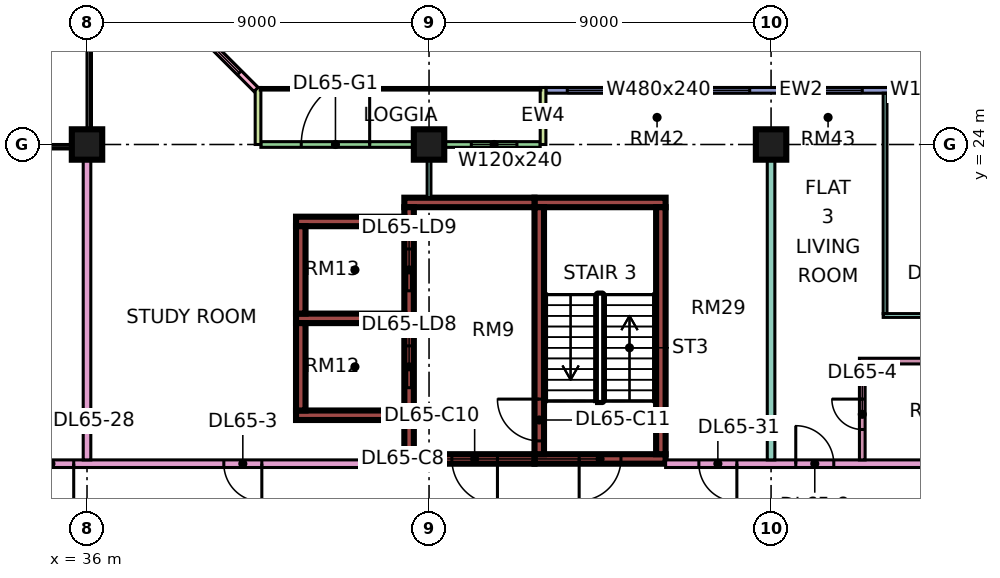
"""IFC4 building model, lengths in metres.
Left out: names, types, materials, properties, quantities, classifications, styles, units other than length and angle.
Written with IfcOpenShell. Run it as: python <this file> out.ifc"""

import sys

from ifc_helpers import new_model, si_unit, direction, frame, frame_2d, origin, origin_2d, place, context, subcontext, project, spatial, rectangle, extrude, element, fill, save


model = new_model("IFC4")
c1 = context("Model", 3, precision=1e-05, world=origin(), true_north=direction((0.0, 1.0)))
c2 = subcontext(c1, "Body", "Model", "MODEL_VIEW")
j1 = project(units=[si_unit("LENGTHUNIT", "METRE"), si_unit("PLANEANGLEUNIT", "RADIAN")], contexts=[c1])
p1 = place(None, origin())
s1 = spatial("IfcSite", under=j1, at=p1, CompositionType="ELEMENT")
p2 = place(p1, origin())
s2 = spatial("IfcBuilding", under=s1, at=p2, CompositionType="ELEMENT")
p3 = place(p2, frame((0.0, 0.0, 280.9)))
s3 = spatial("IfcBuildingStorey", under=s2, at=p3, CompositionType="ELEMENT", Elevation=280.9)
for number, where, z_axis, x_axis in (
    (1, (36.0, 24.0, 0.0), (0.0, 0.0, 1.0), (1.0, 0.0, 0.0)),
    (2, (45.0, 24.0, 0.0), (0.0, 0.0, 1.0), (1.0, 0.0, 0.0)),
    (3, (54.0, 24.0, 0.0), (0.0, 0.0, 1.0), (1.0, 0.0, 0.0)),
):
    element("IfcColumn", number, at=place(p3, frame(where, z_axis=z_axis, x_axis=x_axis)), inside=s3, PredefinedType="COLUMN", context=c2, shape_type="SweptSolid", body=[
        extrude(rectangle(XDim=0.8, YDim=0.8, at=origin_2d()), origin(), (0.0, 0.0, 1.0), 3.75),
    ])
p4 = place(p3, frame((47.775, 15.725, 0.0), z_axis=(0.0, 0.0, 1.0), x_axis=(1.0, 0.0, 0.0)))
e4 = element("IfcWall", 4, at=p4, inside=s3, PredefinedType="SHEAR", context=c2, shape_type="SweptSolid", body=[
    extrude(rectangle(XDim=3.45, YDim=0.25, at=frame_2d((1.725, 0.0))), origin(), (0.0, 0.0, 1.0), 3.75),
])
p5 = place(p4, frame((1.175, 0.0, 0.0)))
e5 = element("IfcOpeningElement", 5, at=p5, cuts=e4, PredefinedType="OPENING", context=c2, shape_type="SweptSolid", body=[
    extrude(rectangle(XDim=1.1, YDim=2.2, at=frame_2d((0.55, 1.1))), frame((0.0, 0.135, 0.0), z_axis=(0.0, -1.0, 0.0), x_axis=(1.0, 0.0, 0.0)), (0.0, 0.0, 1.0), 0.27),
])
p6 = place(p3, frame((47.775, 22.475, 0.0), z_axis=(0.0, 0.0, 1.0), x_axis=(1.0, 0.0, 0.0)))
e6 = element("IfcWall", 6, at=p6, inside=s3, PredefinedType="SHEAR", context=c2, shape_type="SweptSolid", body=[
    extrude(rectangle(XDim=3.45, YDim=0.25, at=frame_2d((1.725, 0.0))), origin(), (0.0, 0.0, 1.0), 3.75),
])
p7 = place(p3, frame((47.9, 15.85, 0.0), z_axis=(0.0, 0.0, 1.0), x_axis=(0.0, 1.0, 0.0)))
e7 = element("IfcWall", 7, at=p7, inside=s3, PredefinedType="SHEAR", context=c2, shape_type="SweptSolid", body=[
    extrude(rectangle(XDim=6.5, YDim=0.25, at=frame_2d((3.25, 0.0))), origin(), (0.0, 0.0, 1.0), 3.75),
])
p8 = place(p7, frame((0.35, 0.0, 0.0)))
e8 = element("IfcOpeningElement", 8, at=p8, cuts=e7, PredefinedType="OPENING", context=c2, shape_type="SweptSolid", body=[
    extrude(rectangle(XDim=1.1, YDim=2.2, at=frame_2d((0.55, 1.1))), frame((0.0, 0.135, 0.0), z_axis=(0.0, -1.0, 0.0), x_axis=(1.0, 0.0, 0.0)), (0.0, 0.0, 1.0), 0.27),
])
p9 = place(p3, frame((51.1, 15.85, 0.0), z_axis=(0.0, 0.0, 1.0), x_axis=(0.0, 1.0, 0.0)))
e9 = element("IfcWall", 9, at=p9, inside=s3, PredefinedType="SHEAR", context=c2, shape_type="SweptSolid", body=[
    extrude(rectangle(XDim=6.5, YDim=0.25, at=frame_2d((3.25, 0.0))), origin(), (0.0, 0.0, 1.0), 3.75),
])
p10 = place(p3, frame((44.35, 15.725, 0.0), z_axis=(0.0, 0.0, 1.0), x_axis=(1.0, 0.0, 0.0)))
e10 = element("IfcWall", 10, at=p10, inside=s3, PredefinedType="SHEAR", context=c2, shape_type="SweptSolid", body=[
    extrude(rectangle(XDim=3.425, YDim=0.25, at=frame_2d((1.712, 0.0))), origin(), (0.0, 0.0, 1.0), 3.75),
])
p11 = place(p10, frame((1.25, 0.0, 0.0)))
e11 = element("IfcOpeningElement", 11, at=p11, cuts=e10, PredefinedType="OPENING", context=c2, shape_type="SweptSolid", body=[
    extrude(rectangle(XDim=1.2, YDim=2.2, at=frame_2d((0.6, 1.1))), frame((0.0, 0.135, 0.0), z_axis=(0.0, -1.0, 0.0), x_axis=(1.0, 0.0, 0.0)), (0.0, 0.0, 1.0), 0.27),
])
p12 = place(p3, frame((44.35, 22.475, 0.0), z_axis=(0.0, 0.0, 1.0), x_axis=(1.0, 0.0, 0.0)))
e12 = element("IfcWall", 12, at=p12, inside=s3, PredefinedType="SHEAR", context=c2, shape_type="SweptSolid", body=[
    extrude(rectangle(XDim=3.425, YDim=0.25, at=frame_2d((1.712, 0.0))), origin(), (0.0, 0.0, 1.0), 3.75),
])
p13 = place(p3, frame((44.475, 15.85, 0.0), z_axis=(0.0, 0.0, 1.0), x_axis=(0.0, 1.0, 0.0)))
e13 = element("IfcWall", 13, at=p13, inside=s3, PredefinedType="SHEAR", context=c2, shape_type="SweptSolid", body=[
    extrude(rectangle(XDim=6.5, YDim=0.25, at=frame_2d((3.25, 0.0))), origin(), (0.0, 0.0, 1.0), 3.75),
])
p14 = place(p13, frame((1.75, 0.0, 0.0)))
e14 = element("IfcOpeningElement", 14, at=p14, cuts=e13, PredefinedType="OPENING", context=c2, shape_type="SweptSolid", body=[
    extrude(rectangle(XDim=1.1, YDim=2.2, at=frame_2d((0.55, 1.1))), frame((0.0, 0.135, 0.0), z_axis=(0.0, -1.0, 0.0), x_axis=(1.0, 0.0, 0.0)), (0.0, 0.0, 1.0), 0.27),
])
p15 = place(p13, frame((4.3, 0.0, 0.0)))
e15 = element("IfcOpeningElement", 15, at=p15, cuts=e13, PredefinedType="OPENING", context=c2, shape_type="SweptSolid", body=[
    extrude(rectangle(XDim=1.1, YDim=2.2, at=frame_2d((0.55, 1.1))), frame((0.0, 0.135, 0.0), z_axis=(0.0, -1.0, 0.0), x_axis=(1.0, 0.0, 0.0)), (0.0, 0.0, 1.0), 0.27),
])
for number, where, z_axis, x_axis in (
    (16, (41.5, 16.875, 0.0), (0.0, 0.0, 1.0), (1.0, 0.0, 0.0)),
    (17, (41.5, 19.425, 0.0), (0.0, 0.0, 1.0), (1.0, 0.0, 0.0)),
    (18, (41.5, 21.975, 0.0), (0.0, 0.0, 1.0), (1.0, 0.0, 0.0)),
):
    element("IfcWall", number, at=place(p3, frame(where, z_axis=z_axis, x_axis=x_axis)), inside=s3, PredefinedType="SHEAR", context=c2, shape_type="SweptSolid", body=[
        extrude(rectangle(XDim=2.85, YDim=0.25, at=frame_2d((1.425, 0.0))), origin(), (0.0, 0.0, 1.0), 3.75),
    ])
for number, where, z_axis, x_axis in (
    (19, (41.625, 17.0, 0.0), (0.0, 0.0, 1.0), (0.0, 1.0, 0.0)),
    (20, (41.625, 19.55, 0.0), (0.0, 0.0, 1.0), (0.0, 1.0, 0.0)),
):
    element("IfcWall", number, at=place(p3, frame(where, z_axis=z_axis, x_axis=x_axis)), inside=s3, PredefinedType="SHEAR", context=c2, shape_type="SweptSolid", body=[
        extrude(rectangle(XDim=2.3, YDim=0.25, at=frame_2d((1.15, 0.0))), origin(), (0.0, 0.0, 1.0), 3.75),
    ])
p16 = place(p3, frame((61.5, 25.425, 0.0), z_axis=(0.0, 0.0, 1.0), x_axis=(-1.0, 0.0, 0.0)))
e21 = element("IfcWall", 21, at=p16, inside=s3, PredefinedType="SOLIDWALL", context=c2, shape_type="SweptSolid", body=[
    extrude(rectangle(XDim=13.425, YDim=0.15, at=frame_2d((6.712, 0.0))), origin(), (0.0, 0.0, 1.0), 3.35),
])
p17 = place(p16, frame((0.3, 0.0, 0.45)))
e22 = element("IfcOpeningElement", 22, at=p17, cuts=e21, PredefinedType="OPENING", context=c2, shape_type="SweptSolid", body=[
    extrude(rectangle(XDim=0.9, YDim=2.4, at=frame_2d((0.45, 1.2))), frame((0.0, 0.085, 0.0), z_axis=(0.0, -1.0, 0.0), x_axis=(1.0, 0.0, 0.0)), (0.0, 0.0, 1.0), 0.17),
])
p18 = place(p16, frame((2.1, 0.0, 0.45)))
e23 = element("IfcOpeningElement", 23, at=p18, cuts=e21, PredefinedType="OPENING", context=c2, shape_type="SweptSolid", body=[
    extrude(rectangle(XDim=1.8, YDim=2.4, at=frame_2d((0.9, 1.2))), frame((0.0, 0.085, 0.0), z_axis=(0.0, -1.0, 0.0), x_axis=(1.0, 0.0, 0.0)), (0.0, 0.0, 1.0), 0.17),
])
p19 = place(p16, frame((5.1, 0.0, 0.45)))
e24 = element("IfcOpeningElement", 24, at=p19, cuts=e21, PredefinedType="OPENING", context=c2, shape_type="SweptSolid", body=[
    extrude(rectangle(XDim=1.8, YDim=2.4, at=frame_2d((0.9, 1.2))), frame((0.0, 0.085, 0.0), z_axis=(0.0, -1.0, 0.0), x_axis=(1.0, 0.0, 0.0)), (0.0, 0.0, 1.0), 0.17),
])
p20 = place(p16, frame((8.062, 0.0, 0.45)))
e25 = element("IfcOpeningElement", 25, at=p20, cuts=e21, PredefinedType="OPENING", context=c2, shape_type="SweptSolid", body=[
    extrude(rectangle(XDim=4.8, YDim=2.4, at=frame_2d((2.4, 1.2))), frame((0.0, 0.085, 0.0), z_axis=(0.0, -1.0, 0.0), x_axis=(1.0, 0.0, 0.0)), (0.0, 0.0, 1.0), 0.17),
])
p21 = place(p3, frame((47.925, 24.0, 0.0), z_axis=(0.0, 0.0, 1.0), x_axis=(-1.0, 0.0, 0.0)))
e26 = element("IfcWall", 26, at=p21, inside=s3, PredefinedType="SOLIDWALL", context=c2, shape_type="SweptSolid", body=[
    extrude(rectangle(XDim=7.35, YDim=0.15, at=frame_2d((3.675, 0.0))), origin(), (0.0, 0.0, 1.0), 3.35),
])
p22 = place(p21, frame((0.613, 0.0, 0.45)))
e27 = element("IfcOpeningElement", 27, at=p22, cuts=e26, PredefinedType="OPENING", context=c2, shape_type="SweptSolid", body=[
    extrude(rectangle(XDim=1.2, YDim=2.4, at=frame_2d((0.6, 1.2))), frame((0.0, 0.085, 0.0), z_axis=(0.0, -1.0, 0.0), x_axis=(1.0, 0.0, 0.0)), (0.0, 0.0, 1.0), 0.17),
])
p23 = place(p21, frame((4.488, 0.0, 0.0)))
e28 = element("IfcOpeningElement", 28, at=p23, cuts=e26, PredefinedType="OPENING", context=c2, shape_type="SweptSolid", body=[
    extrude(rectangle(XDim=1.8, YDim=2.4, at=frame_2d((0.9, 1.2))), frame((0.0, 0.085, 0.0), z_axis=(0.0, -1.0, 0.0), x_axis=(1.0, 0.0, 0.0)), (0.0, 0.0, 1.0), 0.17),
])
for number, where, z_axis, x_axis in (
    (29, (48.0, 25.5, 0.0), (0.0, 0.0, 1.0), (0.0, -1.0, 0.0)),
    (30, (40.5, 25.5, 0.0), (0.0, 0.0, 1.0), (0.0, -1.0, 0.0)),
):
    element("IfcWall", number, at=place(p3, frame(where, z_axis=z_axis, x_axis=x_axis)), inside=s3, PredefinedType="SOLIDWALL", context=c2, shape_type="SweptSolid", body=[
        extrude(rectangle(XDim=1.5, YDim=0.15, at=frame_2d((0.75, 0.0))), origin(), (0.0, 0.0, 1.0), 3.35),
    ])
p24 = place(p3, frame((40.447, 25.447, 0.0), z_axis=(0.0, 0.0, 1.0), x_axis=(-0.707106781187, 0.707106781187, 0.0)))
e31 = element("IfcWall", 31, at=p24, inside=s3, PredefinedType="SOLIDWALL", context=c2, shape_type="SweptSolid", body=[
    extrude(rectangle(XDim=4.243, YDim=0.15, at=frame_2d((2.121, 0.0))), origin(), (0.0, 0.0, 1.0), 3.35),
])
p25 = place(p24, frame((0.621, 0.0, 0.45)))
e32 = element("IfcOpeningElement", 32, at=p25, cuts=e31, PredefinedType="OPENING", context=c2, shape_type="SweptSolid", body=[
    extrude(rectangle(XDim=3.0, YDim=2.4, at=frame_2d((1.5, 1.2))), frame((0.0, 0.085, 0.0), z_axis=(0.0, -1.0, 0.0), x_axis=(1.0, 0.0, 0.0)), (0.0, 0.0, 1.0), 0.17),
])
p26 = place(p3, frame((34.0, 15.6, 0.0), z_axis=(0.0, 0.0, 1.0), x_axis=(1.0, 0.0, 0.0)))
e33 = element("IfcWall", 33, at=p26, inside=s3, PredefinedType="PARTITIONING", context=c2, shape_type="SweptSolid", body=[
    extrude(rectangle(XDim=10.35, YDim=0.2, at=frame_2d((5.175, 0.0))), origin(), (0.0, 0.0, 1.0), 3.35),
])
p27 = place(p26, frame((5.6, 0.0, 0.0)))
e34 = element("IfcOpeningElement", 34, at=p27, cuts=e33, PredefinedType="OPENING", context=c2, shape_type="SweptSolid", body=[
    extrude(rectangle(XDim=1.0, YDim=2.1, at=frame_2d((0.5, 1.05))), frame((0.0, 0.11, 0.0), z_axis=(0.0, -1.0, 0.0), x_axis=(1.0, 0.0, 0.0)), (0.0, 0.0, 1.0), 0.22),
])
p28 = place(p26, frame((0.45, 0.0, 0.0)))
e35 = element("IfcOpeningElement", 35, at=p28, cuts=e33, PredefinedType="OPENING", context=c2, shape_type="SweptSolid", body=[
    extrude(rectangle(XDim=1.2, YDim=2.1, at=frame_2d((0.6, 1.05))), frame((0.0, 0.11, 0.0), z_axis=(0.0, -1.0, 0.0), x_axis=(1.0, 0.0, 0.0)), (0.0, 0.0, 1.0), 0.22),
])
p29 = place(p3, frame((36.0, 15.7, 0.0), z_axis=(0.0, 0.0, 1.0), x_axis=(0.0, 1.0, 0.0)))
e36 = element("IfcWall", 36, at=p29, inside=s3, PredefinedType="PARTITIONING", context=c2, shape_type="SweptSolid", body=[
    extrude(rectangle(XDim=8.3, YDim=0.2, at=frame_2d((4.15, 0.0))), origin(), (0.0, 0.0, 1.0), 3.35),
])
p30 = place(p3, frame((45.0, 22.6, 0.0), z_axis=(0.0, 0.0, 1.0), x_axis=(0.0, 1.0, 0.0)))
e37 = element("IfcWall", 37, at=p30, inside=s3, PredefinedType="PARTITIONING", context=c2, shape_type="SweptSolid", body=[
    extrude(rectangle(XDim=1.326, YDim=0.1, at=frame_2d((0.663, 0.0))), origin(), (0.0, 0.0, 1.0), 3.35),
])
p31 = place(p3, frame((51.225, 15.6, 0.0), z_axis=(0.0, 0.0, 1.0), x_axis=(1.0, 0.0, 0.0)))
e38 = element("IfcWall", 38, at=p31, inside=s3, PredefinedType="PARTITIONING", context=c2, shape_type="SweptSolid", body=[
    extrude(rectangle(XDim=11.701, YDim=0.2, at=frame_2d((5.851, 0.0))), origin(), (0.0, 0.0, 1.0), 3.35),
])
p32 = place(p31, frame((3.425, 0.0, 0.0)))
e39 = element("IfcOpeningElement", 39, at=p32, cuts=e38, PredefinedType="OPENING", context=c2, shape_type="SweptSolid", body=[
    extrude(rectangle(XDim=1.0, YDim=2.1, at=frame_2d((0.5, 1.05))), frame((0.0, 0.11, 0.0), z_axis=(0.0, -1.0, 0.0), x_axis=(1.0, 0.0, 0.0)), (0.0, 0.0, 1.0), 0.22),
])
p33 = place(p31, frame((0.875, 0.0, 0.0)))
e40 = element("IfcOpeningElement", 40, at=p33, cuts=e38, PredefinedType="OPENING", context=c2, shape_type="SweptSolid", body=[
    extrude(rectangle(XDim=1.0, YDim=2.1, at=frame_2d((0.5, 1.05))), frame((0.0, 0.11, 0.0), z_axis=(0.0, -1.0, 0.0), x_axis=(1.0, 0.0, 0.0)), (0.0, 0.0, 1.0), 0.22),
])
p34 = place(p3, frame((54.0, 15.7, 0.0), z_axis=(0.0, 0.0, 1.0), x_axis=(0.0, 1.0, 0.0)))
e41 = element("IfcWall", 41, at=p34, inside=s3, PredefinedType="PARTITIONING", context=c2, shape_type="SweptSolid", body=[
    extrude(rectangle(XDim=8.3, YDim=0.2, at=frame_2d((4.15, 0.0))), origin(), (0.0, 0.0, 1.0), 3.35),
])
p35 = place(p3, frame((56.325, 18.3, 0.0), z_axis=(0.0, 0.0, 1.0), x_axis=(1.0, 0.0, 0.0)))
e42 = element("IfcWall", 42, at=p35, inside=s3, PredefinedType="PARTITIONING", context=c2, shape_type="SweptSolid", body=[
    extrude(rectangle(XDim=6.601, YDim=0.15, at=frame_2d((3.301, 0.0))), origin(), (0.0, 0.0, 1.0), 3.35),
])
p36 = place(p35, frame((4.725, 0.0, 0.0)))
e43 = element("IfcOpeningElement", 43, at=p36, cuts=e42, PredefinedType="OPENING", context=c2, shape_type="SweptSolid", body=[
    extrude(rectangle(XDim=0.9, YDim=2.1, at=frame_2d((0.45, 1.05))), frame((0.0, 0.085, 0.0), z_axis=(0.0, -1.0, 0.0), x_axis=(1.0, 0.0, 0.0)), (0.0, 0.0, 1.0), 0.17),
])
p37 = place(p3, frame((56.4, 15.7, 0.0), z_axis=(0.0, 0.0, 1.0), x_axis=(0.0, 1.0, 0.0)))
e44 = element("IfcWall", 44, at=p37, inside=s3, PredefinedType="PARTITIONING", context=c2, shape_type="SweptSolid", body=[
    extrude(rectangle(XDim=2.525, YDim=0.15, at=frame_2d((1.263, 0.0))), origin(), (0.0, 0.0, 1.0), 3.35),
])
p38 = place(p37, frame((0.8, 0.0, 0.0)))
e45 = element("IfcOpeningElement", 45, at=p38, cuts=e44, PredefinedType="OPENING", context=c2, shape_type="SweptSolid", body=[
    extrude(rectangle(XDim=0.8, YDim=2.1, at=frame_2d((0.4, 1.05))), frame((0.0, 0.085, 0.0), z_axis=(0.0, -1.0, 0.0), x_axis=(1.0, 0.0, 0.0)), (0.0, 0.0, 1.0), 0.17),
])
p39 = place(p3, frame((56.95, 19.5, 0.0), z_axis=(0.0, 0.0, 1.0), x_axis=(1.0, 0.0, 0.0)))
e46 = element("IfcWall", 46, at=p39, inside=s3, PredefinedType="PARTITIONING", context=c2, shape_type="SweptSolid", body=[
    extrude(rectangle(XDim=5.976, YDim=0.1, at=frame_2d((2.988, 0.0))), origin(), (0.0, 0.0, 1.0), 3.35),
])
p40 = place(p39, frame((1.1, 0.0, 0.0)))
e47 = element("IfcOpeningElement", 47, at=p40, cuts=e46, PredefinedType="OPENING", context=c2, shape_type="SweptSolid", body=[
    extrude(rectangle(XDim=0.9, YDim=2.1, at=frame_2d((0.45, 1.05))), frame((0.0, 0.06, 0.0), z_axis=(0.0, -1.0, 0.0), x_axis=(1.0, 0.0, 0.0)), (0.0, 0.0, 1.0), 0.12),
])
p41 = place(p39, frame((4.1, 0.0, 0.0)))
e48 = element("IfcOpeningElement", 48, at=p41, cuts=e46, PredefinedType="OPENING", context=c2, shape_type="SweptSolid", body=[
    extrude(rectangle(XDim=0.9, YDim=2.1, at=frame_2d((0.45, 1.05))), frame((0.0, 0.06, 0.0), z_axis=(0.0, -1.0, 0.0), x_axis=(1.0, 0.0, 0.0)), (0.0, 0.0, 1.0), 0.12),
])
p42 = place(p3, frame((57.0, 19.55, 0.0), z_axis=(0.0, 0.0, 1.0), x_axis=(0.0, 1.0, 0.0)))
e49 = element("IfcWall", 49, at=p42, inside=s3, PredefinedType="PARTITIONING", context=c2, shape_type="SweptSolid", body=[
    extrude(rectangle(XDim=5.8, YDim=0.1, at=frame_2d((2.9, 0.0))), origin(), (0.0, 0.0, 1.0), 3.35),
])
p43 = place(p18, origin())
e50 = element("IfcWindow", 50, at=p43, inside=s3, PartitioningType="SINGLE_PANEL", PredefinedType="WINDOW", context=c2, shape_type="SweptSolid", body=[
    extrude(rectangle(XDim=1.8, YDim=2.4, at=frame_2d((0.9, 1.2))), frame((0.0, 0.03, 0.0), z_axis=(0.0, -1.0, 0.0), x_axis=(1.0, 0.0, 0.0)), (0.0, 0.0, 1.0), 0.06),
])
fill(e23, e50)
p44 = place(p19, origin())
e51 = element("IfcWindow", 51, at=p44, inside=s3, PartitioningType="SINGLE_PANEL", PredefinedType="WINDOW", context=c2, shape_type="SweptSolid", body=[
    extrude(rectangle(XDim=1.8, YDim=2.4, at=frame_2d((0.9, 1.2))), frame((0.0, 0.03, 0.0), z_axis=(0.0, -1.0, 0.0), x_axis=(1.0, 0.0, 0.0)), (0.0, 0.0, 1.0), 0.06),
])
fill(e24, e51)
p45 = place(p20, origin())
e52 = element("IfcWindow", 52, at=p45, inside=s3, PartitioningType="SINGLE_PANEL", PredefinedType="WINDOW", context=c2, shape_type="SweptSolid", body=[
    extrude(rectangle(XDim=4.8, YDim=2.4, at=frame_2d((2.4, 1.2))), frame((0.0, 0.03, 0.0), z_axis=(0.0, -1.0, 0.0), x_axis=(1.0, 0.0, 0.0)), (0.0, 0.0, 1.0), 0.06),
])
fill(e25, e52)
p46 = place(p22, origin())
e53 = element("IfcWindow", 53, at=p46, inside=s3, PartitioningType="SINGLE_PANEL", PredefinedType="WINDOW", context=c2, shape_type="SweptSolid", body=[
    extrude(rectangle(XDim=1.2, YDim=2.4, at=frame_2d((0.6, 1.2))), frame((0.0, 0.03, 0.0), z_axis=(0.0, -1.0, 0.0), x_axis=(1.0, 0.0, 0.0)), (0.0, 0.0, 1.0), 0.06),
])
fill(e27, e53)
p47 = place(p23, frame((1.8, 0.0, 0.0), z_axis=(0.0, 0.0, 1.0), x_axis=(-1.0, 0.0, 0.0)))
e54 = element("IfcDoor", 54, at=p47, inside=s3, OperationType="DOUBLE_DOOR_SINGLE_SWING", PredefinedType="DOOR", context=c2, shape_type="SweptSolid", body=[
    extrude(rectangle(XDim=1.8, YDim=2.4, at=frame_2d((0.9, 1.2))), frame((0.0, 0.025, 0.0), z_axis=(0.0, -1.0, 0.0), x_axis=(1.0, 0.0, 0.0)), (0.0, 0.0, 1.0), 0.05),
])
fill(e28, e54)
p48 = place(p25, origin())
e55 = element("IfcWindow", 55, at=p48, inside=s3, PartitioningType="SINGLE_PANEL", PredefinedType="WINDOW", context=c2, shape_type="SweptSolid", body=[
    extrude(rectangle(XDim=3.0, YDim=2.4, at=frame_2d((1.5, 1.2))), frame((0.0, 0.03, 0.0), z_axis=(0.0, -1.0, 0.0), x_axis=(1.0, 0.0, 0.0)), (0.0, 0.0, 1.0), 0.06),
])
fill(e32, e55)
p49 = place(p5, frame((1.1, 0.0, 0.0), z_axis=(0.0, 0.0, 1.0), x_axis=(-1.0, 0.0, 0.0)))
e56 = element("IfcDoor", 56, at=p49, inside=s3, OperationType="SINGLE_SWING_LEFT", PredefinedType="DOOR", context=c2, shape_type="SweptSolid", body=[
    extrude(rectangle(XDim=1.1, YDim=2.2, at=frame_2d((0.55, 1.1))), frame((0.0, 0.025, 0.0), z_axis=(0.0, -1.0, 0.0), x_axis=(1.0, 0.0, 0.0)), (0.0, 0.0, 1.0), 0.05),
])
fill(e5, e56)
p50 = place(p11, origin())
e57 = element("IfcDoor", 57, at=p50, inside=s3, OperationType="SINGLE_SWING_RIGHT", PredefinedType="DOOR", context=c2, shape_type="SweptSolid", body=[
    extrude(rectangle(XDim=1.2, YDim=2.2, at=frame_2d((0.6, 1.1))), frame((0.0, 0.025, 0.0), z_axis=(0.0, -1.0, 0.0), x_axis=(1.0, 0.0, 0.0)), (0.0, 0.0, 1.0), 0.05),
])
fill(e11, e57)
p51 = place(p8, frame((1.1, 0.0, 0.0), z_axis=(0.0, 0.0, 1.0), x_axis=(-1.0, 0.0, 0.0)))
e58 = element("IfcDoor", 58, at=p51, inside=s3, OperationType="SINGLE_SWING_RIGHT", PredefinedType="DOOR", context=c2, shape_type="SweptSolid", body=[
    extrude(rectangle(XDim=1.1, YDim=2.2, at=frame_2d((0.55, 1.1))), frame((0.0, 0.025, 0.0), z_axis=(0.0, -1.0, 0.0), x_axis=(1.0, 0.0, 0.0)), (0.0, 0.0, 1.0), 0.05),
])
fill(e8, e58)
p52 = place(p14, origin())
e59 = element("IfcDoor", 59, at=p52, inside=s3, OperationType="DOUBLE_DOOR_SLIDING", PredefinedType="DOOR", context=c2, shape_type="SweptSolid", body=[
    extrude(rectangle(XDim=1.1, YDim=2.2, at=frame_2d((0.55, 1.1))), frame((0.0, 0.025, 0.0), z_axis=(0.0, -1.0, 0.0), x_axis=(1.0, 0.0, 0.0)), (0.0, 0.0, 1.0), 0.05),
])
fill(e14, e59)
p53 = place(p15, origin())
e60 = element("IfcDoor", 60, at=p53, inside=s3, OperationType="DOUBLE_DOOR_SLIDING", PredefinedType="DOOR", context=c2, shape_type="SweptSolid", body=[
    extrude(rectangle(XDim=1.1, YDim=2.2, at=frame_2d((0.55, 1.1))), frame((0.0, 0.025, 0.0), z_axis=(0.0, -1.0, 0.0), x_axis=(1.0, 0.0, 0.0)), (0.0, 0.0, 1.0), 0.05),
])
fill(e15, e60)
p54 = place(p27, origin())
e61 = element("IfcDoor", 61, at=p54, inside=s3, OperationType="SINGLE_SWING_RIGHT", PredefinedType="DOOR", context=c2, shape_type="SweptSolid", body=[
    extrude(rectangle(XDim=1.0, YDim=2.1, at=frame_2d((0.5, 1.05))), frame((0.0, 0.025, 0.0), z_axis=(0.0, -1.0, 0.0), x_axis=(1.0, 0.0, 0.0)), (0.0, 0.0, 1.0), 0.05),
])
fill(e34, e61)
p55 = place(p38, frame((0.8, 0.0, 0.0), z_axis=(0.0, 0.0, 1.0), x_axis=(-1.0, 0.0, 0.0)))
e62 = element("IfcDoor", 62, at=p55, inside=s3, OperationType="SINGLE_SWING_RIGHT", PredefinedType="DOOR", context=c2, shape_type="SweptSolid", body=[
    extrude(rectangle(XDim=0.8, YDim=2.1, at=frame_2d((0.4, 1.05))), frame((0.0, 0.025, 0.0), z_axis=(0.0, -1.0, 0.0), x_axis=(1.0, 0.0, 0.0)), (0.0, 0.0, 1.0), 0.05),
])
fill(e45, e62)
p56 = place(p32, origin())
e63 = element("IfcDoor", 63, at=p56, inside=s3, OperationType="SINGLE_SWING_LEFT", PredefinedType="DOOR", context=c2, shape_type="SweptSolid", body=[
    extrude(rectangle(XDim=1.0, YDim=2.1, at=frame_2d((0.5, 1.05))), frame((0.0, 0.025, 0.0), z_axis=(0.0, -1.0, 0.0), x_axis=(1.0, 0.0, 0.0)), (0.0, 0.0, 1.0), 0.05),
])
fill(e39, e63)
p57 = place(p28, origin())
e64 = element("IfcDoor", 64, at=p57, inside=s3, OperationType="SINGLE_SWING_RIGHT", PredefinedType="DOOR", context=c2, shape_type="SweptSolid", body=[
    extrude(rectangle(XDim=1.2, YDim=2.1, at=frame_2d((0.6, 1.05))), frame((0.0, 0.025, 0.0), z_axis=(0.0, -1.0, 0.0), x_axis=(1.0, 0.0, 0.0)), (0.0, 0.0, 1.0), 0.05),
])
fill(e35, e64)
p58 = place(p33, origin())
e65 = element("IfcDoor", 65, at=p58, inside=s3, OperationType="SINGLE_SWING_RIGHT", PredefinedType="DOOR", context=c2, shape_type="SweptSolid", body=[
    extrude(rectangle(XDim=1.0, YDim=2.1, at=frame_2d((0.5, 1.05))), frame((0.0, 0.025, 0.0), z_axis=(0.0, -1.0, 0.0), x_axis=(1.0, 0.0, 0.0)), (0.0, 0.0, 1.0), 0.05),
])
fill(e40, e65)
save(model, sys.argv[1])
